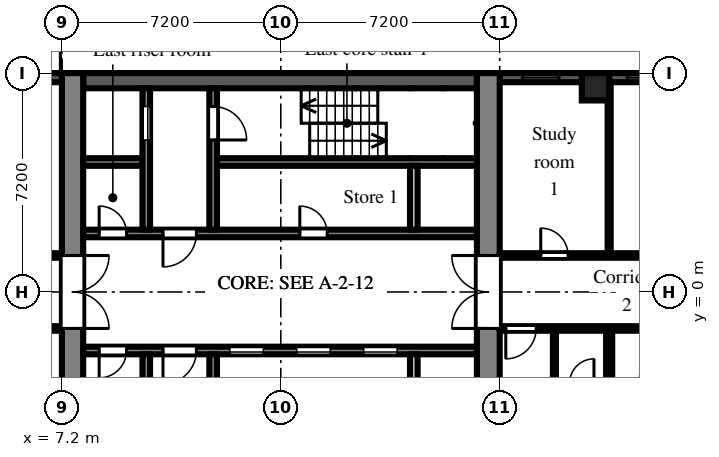
"""IFC4 building model, lengths in metres.
Left out: names, types, materials, properties, quantities, classifications, styles, units other than length and angle.
Written with IfcOpenShell. Run it as: python <this file> out.ifc"""

import sys

from ifc_helpers import new_model, si_unit, direction, frame, frame_2d, origin, origin_2d, place, context, subcontext, project, spatial, rectangle, extrude, element, fill, save


model = new_model("IFC4")
c1 = context("Model", 3, precision=1e-05, world=origin(), true_north=direction((0.0, 1.0)))
c2 = subcontext(c1, "Body", "Model", "MODEL_VIEW")
j1 = project(units=[si_unit("LENGTHUNIT", "METRE"), si_unit("PLANEANGLEUNIT", "RADIAN")], contexts=[c1])
p1 = place(None, origin())
s1 = spatial("IfcSite", under=j1, at=p1, CompositionType="ELEMENT")
p2 = place(p1, origin())
s2 = spatial("IfcBuilding", under=s1, at=p2, CompositionType="ELEMENT")
p3 = place(p2, frame((0.0, 0.0, 66.9)))
s3 = spatial("IfcBuildingStorey", under=s2, at=p3, CompositionType="ELEMENT", Elevation=66.9)
p4 = place(p3, frame((24.75, 6.75, 0.0), z_axis=(0.0, 0.0, 1.0), x_axis=(1.0, 0.0, 0.0)))
e1 = element("IfcColumn", 1, at=p4, inside=s3, PredefinedType="COLUMN", context=c2, shape_type="SweptSolid", body=[
    extrude(rectangle(XDim=0.9, YDim=0.9, at=origin_2d()), origin(), (0.0, 0.0, 1.0), 3.0),
])
p5 = place(p3, frame((28.35, 7.05, 0.0), z_axis=(0.0, 0.0, 1.0), x_axis=(-1.0, 0.0, 0.0)))
e2 = element("IfcWall", 2, at=p5, inside=s3, PredefinedType="SOLIDWALL", context=c2, shape_type="SweptSolid", body=[
    extrude(rectangle(XDim=3.15, YDim=0.3, at=frame_2d((1.575, 0.0))), origin(), (0.0, 0.0, 1.0), 2.1),
])
p6 = place(p5, frame((0.15, 0.0, 0.2)))
e3 = element("IfcOpeningElement", 3, at=p6, cuts=e2, PredefinedType="OPENING", context=c2, shape_type="SweptSolid", body=[
    extrude(rectangle(XDim=2.4, YDim=1.85, at=frame_2d((1.2, 0.925))), frame((0.0, 0.16, 0.0), z_axis=(0.0, -1.0, 0.0), x_axis=(1.0, 0.0, 0.0)), (0.0, 0.0, 1.0), 0.32),
])
p7 = place(p3, frame((24.3, 7.05, 0.0), z_axis=(0.0, 0.0, 1.0), x_axis=(-1.0, 0.0, 0.0)))
e4 = element("IfcWall", 4, at=p7, inside=s3, PredefinedType="SOLIDWALL", context=c2, shape_type="SweptSolid", body=[
    extrude(rectangle(XDim=2.7, YDim=0.3, at=frame_2d((1.35, 0.0))), origin(), (0.0, 0.0, 1.0), 2.1),
])
p8 = place(p7, frame((0.75, 0.0, 0.2)))
e5 = element("IfcOpeningElement", 5, at=p8, cuts=e4, PredefinedType="OPENING", context=c2, shape_type="SweptSolid", body=[
    extrude(rectangle(XDim=1.2, YDim=1.85, at=frame_2d((0.6, 0.925))), frame((0.0, 0.16, 0.0), z_axis=(0.0, -1.0, 0.0), x_axis=(1.0, 0.0, 0.0)), (0.0, 0.0, 1.0), 0.32),
])
p9 = place(p3, frame((7.2, 7.05, 0.0), z_axis=(0.0, 0.0, 1.0), x_axis=(-1.0, 0.0, 0.0)))
e6 = element("IfcWall", 6, at=p9, inside=s3, PredefinedType="SOLIDWALL", context=c2, shape_type="SweptSolid", body=[
    extrude(rectangle(XDim=3.0, YDim=0.3, at=frame_2d((1.5, 0.0))), origin(), (0.0, 0.0, 1.0), 2.1),
])
p10 = place(p3, frame((7.55, -7.2, 0.0), z_axis=(0.0, 0.0, 1.0), x_axis=(0.0, 1.0, 0.0)))
e7 = element("IfcWall", 7, at=p10, inside=s3, PredefinedType="SHEAR", context=c2, shape_type="SweptSolid", body=[
    extrude(rectangle(XDim=14.4, YDim=0.7, at=frame_2d((7.2, 0.0))), origin(), (0.0, 0.0, 1.0), 2.575),
])
p11 = place(p10, frame((6.0, 0.0, 0.0)))
e8 = element("IfcOpeningElement", 8, at=p11, cuts=e7, PredefinedType="OPENING", context=c2, shape_type="SweptSolid", body=[
    extrude(rectangle(XDim=2.4, YDim=2.2, at=frame_2d((1.2, 1.1))), frame((0.0, 0.36, 0.0), z_axis=(0.0, -1.0, 0.0), x_axis=(1.0, 0.0, 0.0)), (0.0, 0.0, 1.0), 0.72),
])
p12 = place(p3, frame((21.225, -7.2, 0.0), z_axis=(0.0, 0.0, 1.0), x_axis=(0.0, 1.0, 0.0)))
e9 = element("IfcWall", 9, at=p12, inside=s3, PredefinedType="SHEAR", context=c2, shape_type="SweptSolid", body=[
    extrude(rectangle(XDim=14.4, YDim=0.75, at=frame_2d((7.2, 0.0))), origin(), (0.0, 0.0, 1.0), 2.575),
])
p13 = place(p12, frame((6.0, 0.0, 0.0)))
e10 = element("IfcOpeningElement", 10, at=p13, cuts=e9, PredefinedType="OPENING", context=c2, shape_type="SweptSolid", body=[
    extrude(rectangle(XDim=2.4, YDim=2.2, at=frame_2d((1.2, 1.1))), frame((0.0, 0.385, 0.0), z_axis=(0.0, -1.0, 0.0), x_axis=(1.0, 0.0, 0.0)), (0.0, 0.0, 1.0), 0.77),
])
p14 = place(p3, frame((7.9, 6.95, 0.0), z_axis=(0.0, 0.0, 1.0), x_axis=(1.0, 0.0, 0.0)))
e11 = element("IfcWall", 11, at=p14, inside=s3, PredefinedType="SHEAR", context=c2, shape_type="SweptSolid", body=[
    extrude(rectangle(XDim=12.95, YDim=0.5, at=frame_2d((6.475, 0.0))), origin(), (0.0, 0.0, 1.0), 2.575),
])
p15 = place(p3, frame((7.9, 1.925, 0.0), z_axis=(0.0, 0.0, 1.0), x_axis=(1.0, 0.0, 0.0)))
e12 = element("IfcWall", 12, at=p15, inside=s3, PredefinedType="SHEAR", context=c2, shape_type="SweptSolid", body=[
    extrude(rectangle(XDim=12.95, YDim=0.25, at=frame_2d((6.475, 0.0))), origin(), (0.0, 0.0, 1.0), 2.575),
])
p16 = place(p15, frame((0.525, 0.0, 0.0)))
e13 = element("IfcOpeningElement", 13, at=p16, cuts=e12, PredefinedType="OPENING", context=c2, shape_type="SweptSolid", body=[
    extrude(rectangle(XDim=0.9, YDim=2.1, at=frame_2d((0.45, 1.05))), frame((0.0, 0.135, 0.0), z_axis=(0.0, -1.0, 0.0), x_axis=(1.0, 0.0, 0.0)), (0.0, 0.0, 1.0), 0.27),
])
p17 = place(p15, frame((2.625, 0.0, 0.0)))
e14 = element("IfcOpeningElement", 14, at=p17, cuts=e12, PredefinedType="OPENING", context=c2, shape_type="SweptSolid", body=[
    extrude(rectangle(XDim=1.1, YDim=2.1, at=frame_2d((0.55, 1.05))), frame((0.0, 0.135, 0.0), z_axis=(0.0, -1.0, 0.0), x_axis=(1.0, 0.0, 0.0)), (0.0, 0.0, 1.0), 0.27),
])
p18 = place(p15, frame((7.125, 0.0, 0.0)))
e15 = element("IfcOpeningElement", 15, at=p18, cuts=e12, PredefinedType="OPENING", context=c2, shape_type="SweptSolid", body=[
    extrude(rectangle(XDim=0.9, YDim=2.1, at=frame_2d((0.45, 1.05))), frame((0.0, 0.135, 0.0), z_axis=(0.0, -1.0, 0.0), x_axis=(1.0, 0.0, 0.0)), (0.0, 0.0, 1.0), 0.27),
])
p19 = place(p3, frame((7.9, 4.275, 0.0), z_axis=(0.0, 0.0, 1.0), x_axis=(1.0, 0.0, 0.0)))
e16 = element("IfcWall", 16, at=p19, inside=s3, PredefinedType="SHEAR", context=c2, shape_type="SweptSolid", body=[
    extrude(rectangle(XDim=1.95, YDim=0.25, at=frame_2d((0.975, 0.0))), origin(), (0.0, 0.0, 1.0), 2.575),
])
p20 = place(p3, frame((12.3, 4.275, 0.0), z_axis=(0.0, 0.0, 1.0), x_axis=(1.0, 0.0, 0.0)))
e17 = element("IfcWall", 17, at=p20, inside=s3, PredefinedType="SHEAR", context=c2, shape_type="SweptSolid", body=[
    extrude(rectangle(XDim=8.55, YDim=0.25, at=frame_2d((4.275, 0.0))), origin(), (0.0, 0.0, 1.0), 2.575),
])
p21 = place(p3, frame((9.975, 2.05, 0.0), z_axis=(0.0, 0.0, 1.0), x_axis=(0.0, 1.0, 0.0)))
e18 = element("IfcWall", 18, at=p21, inside=s3, PredefinedType="SHEAR", context=c2, shape_type="SweptSolid", body=[
    extrude(rectangle(XDim=4.65, YDim=0.25, at=frame_2d((2.325, 0.0))), origin(), (0.0, 0.0, 1.0), 2.575),
])
p22 = place(p21, frame((2.95, 0.0, 0.0)))
e19 = element("IfcOpeningElement", 19, at=p22, cuts=e18, PredefinedType="OPENING", context=c2, shape_type="SweptSolid", body=[
    extrude(rectangle(XDim=1.1, YDim=2.1, at=frame_2d((0.55, 1.05))), frame((0.0, 0.135, 0.0), z_axis=(0.0, -1.0, 0.0), x_axis=(1.0, 0.0, 0.0)), (0.0, 0.0, 1.0), 0.27),
])
p23 = place(p3, frame((12.175, 2.05, 0.0), z_axis=(0.0, 0.0, 1.0), x_axis=(0.0, 1.0, 0.0)))
e20 = element("IfcWall", 20, at=p23, inside=s3, PredefinedType="SHEAR", context=c2, shape_type="SweptSolid", body=[
    extrude(rectangle(XDim=4.65, YDim=0.25, at=frame_2d((2.325, 0.0))), origin(), (0.0, 0.0, 1.0), 2.575),
])
p24 = place(p23, frame((2.95, 0.0, 0.0)))
e21 = element("IfcOpeningElement", 21, at=p24, cuts=e20, PredefinedType="OPENING", context=c2, shape_type="SweptSolid", body=[
    extrude(rectangle(XDim=1.1, YDim=2.1, at=frame_2d((0.55, 1.05))), frame((0.0, 0.135, 0.0), z_axis=(0.0, -1.0, 0.0), x_axis=(1.0, 0.0, 0.0)), (0.0, 0.0, 1.0), 0.27),
])
p25 = place(p3, frame((18.775, 2.05, 0.0), z_axis=(0.0, 0.0, 1.0), x_axis=(0.0, 1.0, 0.0)))
e22 = element("IfcWall", 22, at=p25, inside=s3, PredefinedType="PARTITIONING", context=c2, shape_type="SweptSolid", body=[
    extrude(rectangle(XDim=2.1, YDim=0.25, at=frame_2d((1.05, 0.0))), origin(), (0.0, 0.0, 1.0), 2.575),
])
p26 = place(p3, frame((7.9, -1.925, 0.0), z_axis=(0.0, 0.0, 1.0), x_axis=(1.0, 0.0, 0.0)))
e23 = element("IfcWall", 23, at=p26, inside=s3, PredefinedType="SHEAR", context=c2, shape_type="SweptSolid", body=[
    extrude(rectangle(XDim=12.95, YDim=0.25, at=frame_2d((6.475, 0.0))), origin(), (0.0, 0.0, 1.0), 2.575),
])
p27 = place(p26, frame((4.825, 0.0, 0.0)))
e24 = element("IfcOpeningElement", 24, at=p27, cuts=e23, PredefinedType="OPENING", context=c2, shape_type="SweptSolid", body=[
    extrude(rectangle(XDim=1.1, YDim=2.1, at=frame_2d((0.55, 1.05))), frame((0.0, 0.135, 0.0), z_axis=(0.0, -1.0, 0.0), x_axis=(1.0, 0.0, 0.0)), (0.0, 0.0, 1.0), 0.27),
])
p28 = place(p26, frame((7.025, 0.0, 0.0)))
e25 = element("IfcOpeningElement", 25, at=p28, cuts=e23, PredefinedType="OPENING", context=c2, shape_type="SweptSolid", body=[
    extrude(rectangle(XDim=1.1, YDim=2.1, at=frame_2d((0.55, 1.05))), frame((0.0, 0.135, 0.0), z_axis=(0.0, -1.0, 0.0), x_axis=(1.0, 0.0, 0.0)), (0.0, 0.0, 1.0), 0.27),
])
p29 = place(p26, frame((9.225, 0.0, 0.0)))
e26 = element("IfcOpeningElement", 26, at=p29, cuts=e23, PredefinedType="OPENING", context=c2, shape_type="SweptSolid", body=[
    extrude(rectangle(XDim=1.1, YDim=2.1, at=frame_2d((0.55, 1.05))), frame((0.0, 0.135, 0.0), z_axis=(0.0, -1.0, 0.0), x_axis=(1.0, 0.0, 0.0)), (0.0, 0.0, 1.0), 0.27),
])
p30 = place(p26, frame((0.525, 0.0, 0.0)))
e27 = element("IfcOpeningElement", 27, at=p30, cuts=e23, PredefinedType="OPENING", context=c2, shape_type="SweptSolid", body=[
    extrude(rectangle(XDim=0.9, YDim=2.1, at=frame_2d((0.45, 1.05))), frame((0.0, 0.135, 0.0), z_axis=(0.0, -1.0, 0.0), x_axis=(1.0, 0.0, 0.0)), (0.0, 0.0, 1.0), 0.27),
])
p31 = place(p26, frame((2.625, 0.0, 0.0)))
e28 = element("IfcOpeningElement", 28, at=p31, cuts=e23, PredefinedType="OPENING", context=c2, shape_type="SweptSolid", body=[
    extrude(rectangle(XDim=1.1, YDim=2.1, at=frame_2d((0.55, 1.05))), frame((0.0, 0.135, 0.0), z_axis=(0.0, -1.0, 0.0), x_axis=(1.0, 0.0, 0.0)), (0.0, 0.0, 1.0), 0.27),
])
p32 = place(p3, frame((9.975, -2.05, 0.0), z_axis=(0.0, 0.0, 1.0), x_axis=(0.0, -1.0, 0.0)))
e29 = element("IfcWall", 29, at=p32, inside=s3, PredefinedType="SHEAR", context=c2, shape_type="SweptSolid", body=[
    extrude(rectangle(XDim=4.65, YDim=0.25, at=frame_2d((2.325, 0.0))), origin(), (0.0, 0.0, 1.0), 2.575),
])
p33 = place(p32, frame((2.95, 0.0, 0.0)))
e30 = element("IfcOpeningElement", 30, at=p33, cuts=e29, PredefinedType="OPENING", context=c2, shape_type="SweptSolid", body=[
    extrude(rectangle(XDim=1.1, YDim=2.1, at=frame_2d((0.55, 1.05))), frame((0.0, 0.135, 0.0), z_axis=(0.0, -1.0, 0.0), x_axis=(1.0, 0.0, 0.0)), (0.0, 0.0, 1.0), 0.27),
])
p34 = place(p3, frame((12.175, -2.05, 0.0), z_axis=(0.0, 0.0, 1.0), x_axis=(0.0, -1.0, 0.0)))
e31 = element("IfcWall", 31, at=p34, inside=s3, PredefinedType="SHEAR", context=c2, shape_type="SweptSolid", body=[
    extrude(rectangle(XDim=4.65, YDim=0.25, at=frame_2d((2.325, 0.0))), origin(), (0.0, 0.0, 1.0), 2.575),
])
p35 = place(p34, frame((2.95, 0.0, 0.0)))
e32 = element("IfcOpeningElement", 32, at=p35, cuts=e31, PredefinedType="OPENING", context=c2, shape_type="SweptSolid", body=[
    extrude(rectangle(XDim=1.1, YDim=2.1, at=frame_2d((0.55, 1.05))), frame((0.0, 0.135, 0.0), z_axis=(0.0, -1.0, 0.0), x_axis=(1.0, 0.0, 0.0)), (0.0, 0.0, 1.0), 0.27),
])
p36 = place(p3, frame((18.775, -2.05, 0.0), z_axis=(0.0, 0.0, 1.0), x_axis=(0.0, -1.0, 0.0)))
e33 = element("IfcWall", 33, at=p36, inside=s3, PredefinedType="PARTITIONING", context=c2, shape_type="SweptSolid", body=[
    extrude(rectangle(XDim=2.1, YDim=0.25, at=frame_2d((1.05, 0.0))), origin(), (0.0, 0.0, 1.0), 2.575),
])
p37 = place(p3, frame((1.275, -1.2, 0.0), z_axis=(0.0, 0.0, 1.0), x_axis=(1.0, 0.0, 0.0)))
e34 = element("IfcWall", 34, at=p37, inside=s3, PredefinedType="PARTITIONING", context=c2, shape_type="SweptSolid", body=[
    extrude(rectangle(XDim=5.925, YDim=0.15, at=frame_2d((2.962, 0.0))), origin(), (0.0, 0.0, 1.0), 2.575),
])
p38 = place(p37, frame((4.475, 0.0, 0.0)))
e35 = element("IfcOpeningElement", 35, at=p38, cuts=e34, PredefinedType="OPENING", context=c2, shape_type="SweptSolid", body=[
    extrude(rectangle(XDim=0.9, YDim=2.1, at=frame_2d((0.45, 1.05))), frame((0.0, 0.085, 0.0), z_axis=(0.0, -1.0, 0.0), x_axis=(1.0, 0.0, 0.0)), (0.0, 0.0, 1.0), 0.17),
])
p39 = place(p3, frame((1.275, 1.2, 0.0), z_axis=(0.0, 0.0, 1.0), x_axis=(1.0, 0.0, 0.0)))
e36 = element("IfcWall", 36, at=p39, inside=s3, PredefinedType="PARTITIONING", context=c2, shape_type="SweptSolid", body=[
    extrude(rectangle(XDim=5.925, YDim=0.15, at=frame_2d((2.962, 0.0))), origin(), (0.0, 0.0, 1.0), 2.575),
])
p40 = place(p39, frame((2.475, 0.0, 0.0)))
e37 = element("IfcOpeningElement", 37, at=p40, cuts=e36, PredefinedType="OPENING", context=c2, shape_type="SweptSolid", body=[
    extrude(rectangle(XDim=0.9, YDim=2.1, at=frame_2d((0.45, 1.05))), frame((0.0, 0.085, 0.0), z_axis=(0.0, -1.0, 0.0), x_axis=(1.0, 0.0, 0.0)), (0.0, 0.0, 1.0), 0.17),
])
p41 = place(p3, frame((21.6, -1.2, 0.0), z_axis=(0.0, 0.0, 1.0), x_axis=(1.0, 0.0, 0.0)))
e38 = element("IfcWall", 38, at=p41, inside=s3, PredefinedType="PARTITIONING", context=c2, shape_type="SweptSolid", body=[
    extrude(rectangle(XDim=14.9, YDim=0.15, at=frame_2d((7.45, 0.0))), origin(), (0.0, 0.0, 1.0), 2.575),
])
p42 = place(p41, frame((0.2, 0.0, 0.0)))
e39 = element("IfcOpeningElement", 39, at=p42, cuts=e38, PredefinedType="OPENING", context=c2, shape_type="SweptSolid", body=[
    extrude(rectangle(XDim=1.0, YDim=2.1, at=frame_2d((0.5, 1.05))), frame((0.0, 0.085, 0.0), z_axis=(0.0, -1.0, 0.0), x_axis=(1.0, 0.0, 0.0)), (0.0, 0.0, 1.0), 0.17),
])
p43 = place(p41, frame((5.71, 0.0, 0.0)))
e40 = element("IfcOpeningElement", 40, at=p43, cuts=e38, PredefinedType="OPENING", context=c2, shape_type="SweptSolid", body=[
    extrude(rectangle(XDim=1.0, YDim=2.1, at=frame_2d((0.5, 1.05))), frame((0.0, 0.085, 0.0), z_axis=(0.0, -1.0, 0.0), x_axis=(1.0, 0.0, 0.0)), (0.0, 0.0, 1.0), 0.17),
])
p44 = place(p41, frame((11.95, 0.0, 0.0)))
e41 = element("IfcOpeningElement", 41, at=p44, cuts=e38, PredefinedType="OPENING", context=c2, shape_type="SweptSolid", body=[
    extrude(rectangle(XDim=1.8, YDim=2.1, at=frame_2d((0.9, 1.05))), frame((0.0, 0.085, 0.0), z_axis=(0.0, -1.0, 0.0), x_axis=(1.0, 0.0, 0.0)), (0.0, 0.0, 1.0), 0.17),
])
p45 = place(p3, frame((21.6, 1.2, 0.0), z_axis=(0.0, 0.0, 1.0), x_axis=(1.0, 0.0, 0.0)))
e42 = element("IfcWall", 42, at=p45, inside=s3, PredefinedType="PARTITIONING", context=c2, shape_type="SweptSolid", body=[
    extrude(rectangle(XDim=14.9, YDim=0.15, at=frame_2d((7.45, 0.0))), origin(), (0.0, 0.0, 1.0), 2.575),
])
p46 = place(p45, frame((1.35, 0.0, 0.0)))
e43 = element("IfcOpeningElement", 43, at=p46, cuts=e42, PredefinedType="OPENING", context=c2, shape_type="SweptSolid", body=[
    extrude(rectangle(XDim=0.9, YDim=2.1, at=frame_2d((0.45, 1.05))), frame((0.0, 0.085, 0.0), z_axis=(0.0, -1.0, 0.0), x_axis=(1.0, 0.0, 0.0)), (0.0, 0.0, 1.0), 0.17),
])
p47 = place(p45, frame((6.3, 0.0, 0.0)))
e44 = element("IfcOpeningElement", 44, at=p47, cuts=e42, PredefinedType="OPENING", context=c2, shape_type="SweptSolid", body=[
    extrude(rectangle(XDim=1.8, YDim=2.1, at=frame_2d((0.9, 1.05))), frame((0.0, 0.085, 0.0), z_axis=(0.0, -1.0, 0.0), x_axis=(1.0, 0.0, 0.0)), (0.0, 0.0, 1.0), 0.17),
])
p48 = place(p45, frame((11.95, 0.0, 0.0)))
e45 = element("IfcOpeningElement", 45, at=p48, cuts=e42, PredefinedType="OPENING", context=c2, shape_type="SweptSolid", body=[
    extrude(rectangle(XDim=1.8, YDim=2.1, at=frame_2d((0.9, 1.05))), frame((0.0, 0.085, 0.0), z_axis=(0.0, -1.0, 0.0), x_axis=(1.0, 0.0, 0.0)), (0.0, 0.0, 1.0), 0.17),
])
p49 = place(p3, frame((23.4, -3.05, 0.0), z_axis=(0.0, 0.0, 1.0), x_axis=(0.0, 1.0, 0.0)))
e46 = element("IfcWall", 46, at=p49, inside=s3, PredefinedType="PARTITIONING", context=c2, shape_type="SweptSolid", body=[
    extrude(rectangle(XDim=1.775, YDim=0.1, at=frame_2d((0.888, 0.0))), origin(), (0.0, 0.0, 1.0), 2.575),
])
p50 = place(p3, frame((25.2, -6.9, 0.0), z_axis=(0.0, 0.0, 1.0), x_axis=(0.0, 1.0, 0.0)))
e47 = element("IfcWall", 47, at=p50, inside=s3, PredefinedType="PARTITIONING", context=c2, shape_type="SweptSolid", body=[
    extrude(rectangle(XDim=5.625, YDim=0.2, at=frame_2d((2.812, 0.0))), origin(), (0.0, 0.0, 1.0), 2.575),
])
p51 = place(p3, frame((25.2, 1.275, 0.0), z_axis=(0.0, 0.0, 1.0), x_axis=(0.0, 1.0, 0.0)))
e48 = element("IfcWall", 48, at=p51, inside=s3, PredefinedType="PARTITIONING", context=c2, shape_type="SweptSolid", body=[
    extrude(rectangle(XDim=5.625, YDim=0.1, at=frame_2d((2.812, 0.0))), origin(), (0.0, 0.0, 1.0), 2.575),
])
p52 = place(p6, origin())
e49 = element("IfcWindow", 49, at=p52, inside=s3, PartitioningType="SINGLE_PANEL", PredefinedType="WINDOW", context=c2, shape_type="SweptSolid", body=[
    extrude(rectangle(XDim=2.4, YDim=1.85, at=frame_2d((1.2, 0.925))), frame((0.0, 0.03, 0.0), z_axis=(0.0, -1.0, 0.0), x_axis=(1.0, 0.0, 0.0)), (0.0, 0.0, 1.0), 0.06),
])
fill(e3, e49)
p53 = place(p8, origin())
e50 = element("IfcWindow", 50, at=p53, inside=s3, PartitioningType="SINGLE_PANEL", PredefinedType="WINDOW", context=c2, shape_type="SweptSolid", body=[
    extrude(rectangle(XDim=1.2, YDim=1.85, at=frame_2d((0.6, 0.925))), frame((0.0, 0.03, 0.0), z_axis=(0.0, -1.0, 0.0), x_axis=(1.0, 0.0, 0.0)), (0.0, 0.0, 1.0), 0.06),
])
fill(e5, e50)
p54 = place(p27, origin())
e51 = element("IfcDoor", 51, at=p54, inside=s3, OperationType="SLIDING_TO_LEFT", PredefinedType="DOOR", context=c2, shape_type="SweptSolid", body=[
    extrude(rectangle(XDim=1.1, YDim=2.1, at=frame_2d((0.55, 1.05))), frame((0.0, 0.025, 0.0), z_axis=(0.0, -1.0, 0.0), x_axis=(1.0, 0.0, 0.0)), (0.0, 0.0, 1.0), 0.05),
])
fill(e24, e51)
p55 = place(p28, origin())
e52 = element("IfcDoor", 52, at=p55, inside=s3, OperationType="SLIDING_TO_LEFT", PredefinedType="DOOR", context=c2, shape_type="SweptSolid", body=[
    extrude(rectangle(XDim=1.1, YDim=2.1, at=frame_2d((0.55, 1.05))), frame((0.0, 0.025, 0.0), z_axis=(0.0, -1.0, 0.0), x_axis=(1.0, 0.0, 0.0)), (0.0, 0.0, 1.0), 0.05),
])
fill(e25, e52)
p56 = place(p29, origin())
e53 = element("IfcDoor", 53, at=p56, inside=s3, OperationType="SLIDING_TO_LEFT", PredefinedType="DOOR", context=c2, shape_type="SweptSolid", body=[
    extrude(rectangle(XDim=1.1, YDim=2.1, at=frame_2d((0.55, 1.05))), frame((0.0, 0.025, 0.0), z_axis=(0.0, -1.0, 0.0), x_axis=(1.0, 0.0, 0.0)), (0.0, 0.0, 1.0), 0.05),
])
fill(e26, e53)
p57 = place(p22, origin())
e54 = element("IfcDoor", 54, at=p57, inside=s3, OperationType="SLIDING_TO_LEFT", PredefinedType="DOOR", context=c2, shape_type="SweptSolid", body=[
    extrude(rectangle(XDim=1.1, YDim=2.1, at=frame_2d((0.55, 1.05))), frame((0.0, 0.025, 0.0), z_axis=(0.0, -1.0, 0.0), x_axis=(1.0, 0.0, 0.0)), (0.0, 0.0, 1.0), 0.05),
])
fill(e19, e54)
p58 = place(p24, frame((1.1, 0.0, 0.0), z_axis=(0.0, 0.0, 1.0), x_axis=(-1.0, 0.0, 0.0)))
e55 = element("IfcDoor", 55, at=p58, inside=s3, OperationType="SINGLE_SWING_RIGHT", PredefinedType="DOOR", context=c2, shape_type="SweptSolid", body=[
    extrude(rectangle(XDim=1.1, YDim=2.1, at=frame_2d((0.55, 1.05))), frame((0.0, 0.025, 0.0), z_axis=(0.0, -1.0, 0.0), x_axis=(1.0, 0.0, 0.0)), (0.0, 0.0, 1.0), 0.05),
])
fill(e21, e55)
p59 = place(p16, origin())
e56 = element("IfcDoor", 56, at=p59, inside=s3, OperationType="SINGLE_SWING_LEFT", PredefinedType="DOOR", context=c2, shape_type="SweptSolid", body=[
    extrude(rectangle(XDim=0.9, YDim=2.1, at=frame_2d((0.45, 1.05))), frame((0.0, 0.025, 0.0), z_axis=(0.0, -1.0, 0.0), x_axis=(1.0, 0.0, 0.0)), (0.0, 0.0, 1.0), 0.05),
])
fill(e13, e56)
p60 = place(p30, frame((0.9, 0.0, 0.0), z_axis=(0.0, 0.0, 1.0), x_axis=(-1.0, 0.0, 0.0)))
e57 = element("IfcDoor", 57, at=p60, inside=s3, OperationType="SINGLE_SWING_RIGHT", PredefinedType="DOOR", context=c2, shape_type="SweptSolid", body=[
    extrude(rectangle(XDim=0.9, YDim=2.1, at=frame_2d((0.45, 1.05))), frame((0.0, 0.025, 0.0), z_axis=(0.0, -1.0, 0.0), x_axis=(1.0, 0.0, 0.0)), (0.0, 0.0, 1.0), 0.05),
])
fill(e27, e57)
p61 = place(p17, frame((1.1, 0.0, 0.0), z_axis=(0.0, 0.0, 1.0), x_axis=(-1.0, 0.0, 0.0)))
e58 = element("IfcDoor", 58, at=p61, inside=s3, OperationType="SINGLE_SWING_RIGHT", PredefinedType="DOOR", context=c2, shape_type="SweptSolid", body=[
    extrude(rectangle(XDim=1.1, YDim=2.1, at=frame_2d((0.55, 1.05))), frame((0.0, 0.025, 0.0), z_axis=(0.0, -1.0, 0.0), x_axis=(1.0, 0.0, 0.0)), (0.0, 0.0, 1.0), 0.05),
])
fill(e14, e58)
p62 = place(p31, frame((1.1, 0.0, 0.0), z_axis=(0.0, 0.0, 1.0), x_axis=(-1.0, 0.0, 0.0)))
e59 = element("IfcDoor", 59, at=p62, inside=s3, OperationType="SINGLE_SWING_RIGHT", PredefinedType="DOOR", context=c2, shape_type="SweptSolid", body=[
    extrude(rectangle(XDim=1.1, YDim=2.1, at=frame_2d((0.55, 1.05))), frame((0.0, 0.025, 0.0), z_axis=(0.0, -1.0, 0.0), x_axis=(1.0, 0.0, 0.0)), (0.0, 0.0, 1.0), 0.05),
])
fill(e28, e59)
p63 = place(p11, frame((2.4, 0.0, 0.0), z_axis=(0.0, 0.0, 1.0), x_axis=(-1.0, 0.0, 0.0)))
e60 = element("IfcDoor", 60, at=p63, inside=s3, OperationType="DOUBLE_DOOR_DOUBLE_SWING", PredefinedType="DOOR", context=c2, shape_type="SweptSolid", body=[
    extrude(rectangle(XDim=2.4, YDim=2.2, at=frame_2d((1.2, 1.1))), frame((0.0, 0.025, 0.0), z_axis=(0.0, -1.0, 0.0), x_axis=(1.0, 0.0, 0.0)), (0.0, 0.0, 1.0), 0.05),
])
fill(e8, e60)
p64 = place(p13, origin())
e61 = element("IfcDoor", 61, at=p64, inside=s3, OperationType="DOUBLE_DOOR_DOUBLE_SWING", PredefinedType="DOOR", context=c2, shape_type="SweptSolid", body=[
    extrude(rectangle(XDim=2.4, YDim=2.2, at=frame_2d((1.2, 1.1))), frame((0.0, 0.025, 0.0), z_axis=(0.0, -1.0, 0.0), x_axis=(1.0, 0.0, 0.0)), (0.0, 0.0, 1.0), 0.05),
])
fill(e10, e61)
p65 = place(p18, origin())
e62 = element("IfcDoor", 62, at=p65, inside=s3, OperationType="SINGLE_SWING_LEFT", PredefinedType="DOOR", context=c2, shape_type="SweptSolid", body=[
    extrude(rectangle(XDim=0.9, YDim=2.1, at=frame_2d((0.45, 1.05))), frame((0.0, 0.025, 0.0), z_axis=(0.0, -1.0, 0.0), x_axis=(1.0, 0.0, 0.0)), (0.0, 0.0, 1.0), 0.05),
])
fill(e15, e62)
p66 = place(p46, origin())
e63 = element("IfcDoor", 63, at=p66, inside=s3, OperationType="SINGLE_SWING_LEFT", PredefinedType="DOOR", context=c2, shape_type="SweptSolid", body=[
    extrude(rectangle(XDim=0.9, YDim=2.1, at=frame_2d((0.45, 1.05))), frame((0.0, 0.025, 0.0), z_axis=(0.0, -1.0, 0.0), x_axis=(1.0, 0.0, 0.0)), (0.0, 0.0, 1.0), 0.05),
])
fill(e43, e63)
p67 = place(p42, frame((1.0, 0.0, 0.0), z_axis=(0.0, 0.0, 1.0), x_axis=(-1.0, 0.0, 0.0)))
e64 = element("IfcDoor", 64, at=p67, inside=s3, OperationType="SINGLE_SWING_RIGHT", PredefinedType="DOOR", context=c2, shape_type="SweptSolid", body=[
    extrude(rectangle(XDim=1.0, YDim=2.1, at=frame_2d((0.5, 1.05))), frame((0.0, 0.025, 0.0), z_axis=(0.0, -1.0, 0.0), x_axis=(1.0, 0.0, 0.0)), (0.0, 0.0, 1.0), 0.05),
])
fill(e39, e64)
save(model, sys.argv[1])
